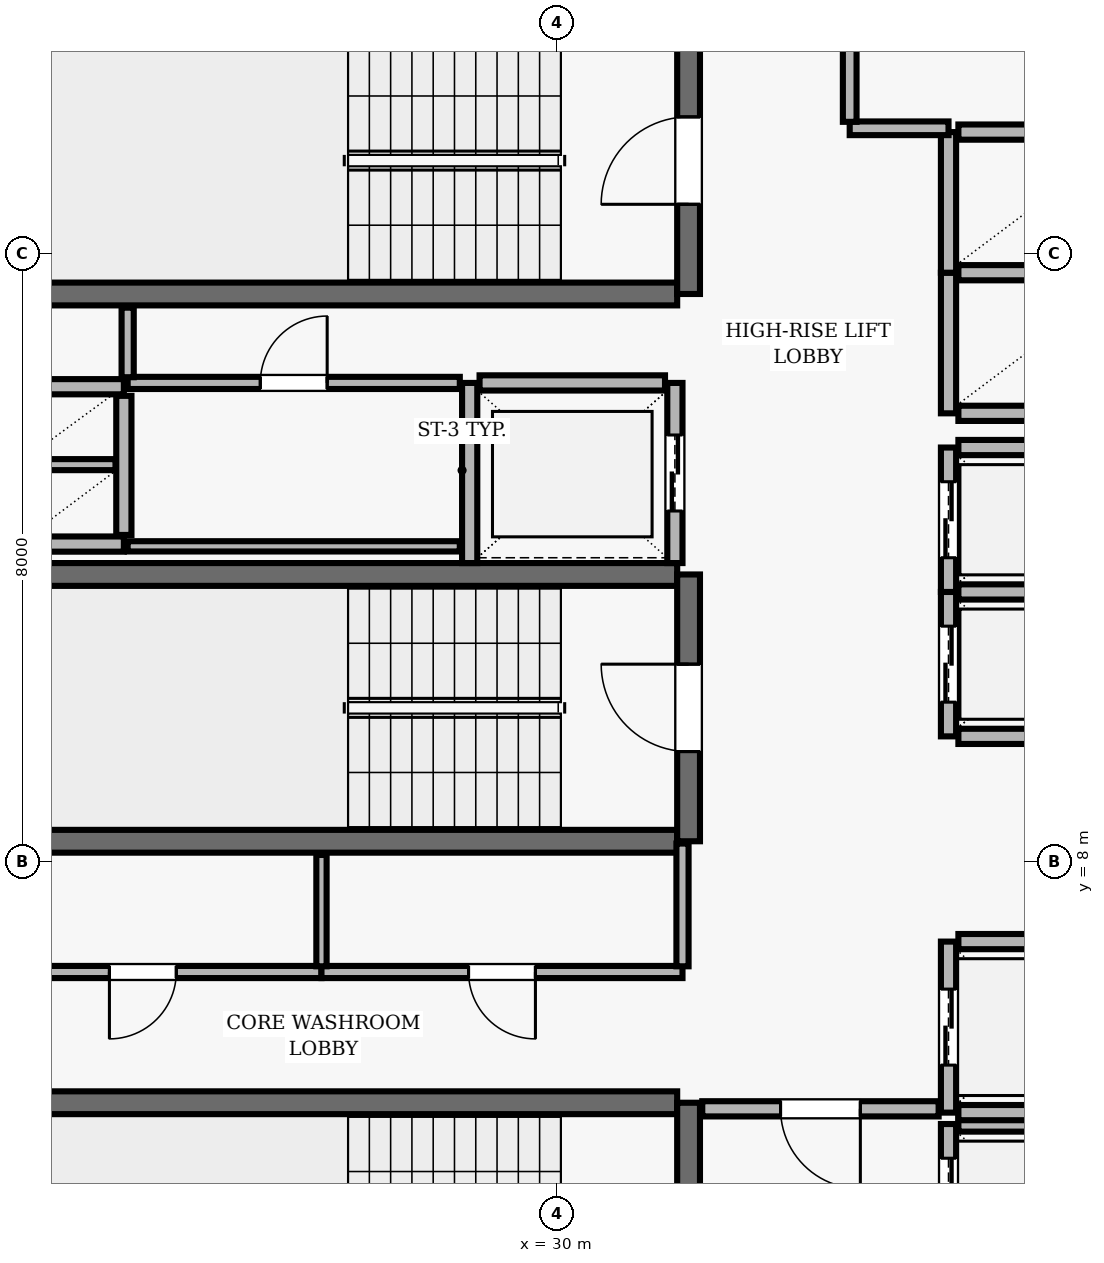
"""IFC4 building model, lengths in metres.
Left out: names, types, materials, properties, quantities, classifications, styles, units other than length and angle.
Written with IfcOpenShell. Run it as: python <this file> out.ifc"""

import sys

from ifc_helpers import new_model, si_unit, direction, frame, frame_2d, origin, place, context, subcontext, project, spatial, rectangle, extrude, element, fill, save


model = new_model("IFC4")
c1 = context("Model", 3, precision=1e-05, world=origin(), true_north=direction((0.0, 1.0)))
c2 = subcontext(c1, "Body", "Model", "MODEL_VIEW")
j1 = project(units=[si_unit("LENGTHUNIT", "METRE"), si_unit("PLANEANGLEUNIT", "RADIAN")], contexts=[c1])
p1 = place(None, origin())
s1 = spatial("IfcSite", under=j1, at=p1, CompositionType="ELEMENT")
p2 = place(p1, origin())
s2 = spatial("IfcBuilding", under=s1, at=p2, CompositionType="ELEMENT")
p3 = place(p2, frame((0.0, 0.0, 291.1)))
s3 = spatial("IfcBuildingStorey", under=s2, at=p3, CompositionType="ELEMENT", Elevation=291.1)
p4 = place(p3, frame((31.58, 4.83, 0.0), z_axis=(0.0, 0.0, 1.0), x_axis=(-1.0, 0.0, 0.0)))
e1 = element("IfcWall", 1, at=p4, inside=s3, PredefinedType="SHEAR", context=c2, shape_type="SweptSolid", body=[
    extrude(rectangle(XDim=8.36, YDim=0.3, at=frame_2d((4.18, 0.0))), origin(), (0.0, 0.0, 1.0), 3.69),
])
p5 = place(p3, frame((31.73, 0.96, 0.0), z_axis=(0.0, 0.0, 1.0), x_axis=(0.0, 1.0, 0.0)))
e2 = element("IfcWall", 2, at=p5, inside=s3, PredefinedType="SHEAR", context=c2, shape_type="SweptSolid", body=[
    extrude(rectangle(XDim=3.87, YDim=0.3, at=frame_2d((1.935, 0.0))), origin(), (0.0, 0.0, 1.0), 3.69),
])
p6 = place(p5, frame((1.54, 0.0, 0.0)))
e3 = element("IfcOpeningElement", 3, at=p6, cuts=e2, PredefinedType="OPENING", context=c2, shape_type="SweptSolid", body=[
    extrude(rectangle(XDim=1.15, YDim=2.15, at=frame_2d((0.575, 1.075))), frame((0.0, 0.16, 0.0), z_axis=(0.0, -1.0, 0.0), x_axis=(1.0, 0.0, 0.0)), (0.0, 0.0, 1.0), 0.32),
])
p7 = place(p3, frame((23.22, 15.47, 0.0), z_axis=(0.0, 0.0, 1.0), x_axis=(1.0, 0.0, 0.0)))
e4 = element("IfcWall", 4, at=p7, inside=s3, PredefinedType="SHEAR", context=c2, shape_type="SweptSolid", body=[
    extrude(rectangle(XDim=8.36, YDim=0.3, at=frame_2d((4.18, 0.0))), origin(), (0.0, 0.0, 1.0), 3.69),
])
p8 = place(p3, frame((31.73, 15.47, 0.0), z_axis=(0.0, 0.0, 1.0), x_axis=(0.0, 1.0, 0.0)))
e5 = element("IfcWall", 5, at=p8, inside=s3, PredefinedType="SHEAR", context=c2, shape_type="SweptSolid", body=[
    extrude(rectangle(XDim=3.51, YDim=0.3, at=frame_2d((1.755, 0.0))), origin(), (0.0, 0.0, 1.0), 3.69),
])
p9 = place(p8, frame((1.18, 0.0, 0.0)))
e6 = element("IfcOpeningElement", 6, at=p9, cuts=e5, PredefinedType="OPENING", context=c2, shape_type="SweptSolid", body=[
    extrude(rectangle(XDim=1.15, YDim=2.15, at=frame_2d((0.575, 1.075))), frame((0.0, 0.16, 0.0), z_axis=(0.0, -1.0, 0.0), x_axis=(1.0, 0.0, 0.0)), (0.0, 0.0, 1.0), 0.32),
])
for number, where, z_axis, x_axis in (
    (7, (31.58, 11.78, 0.0), (0.0, 0.0, 1.0), (-1.0, 0.0, 0.0)),
    (8, (23.22, 8.27, 0.0), (0.0, 0.0, 1.0), (1.0, 0.0, 0.0)),
):
    element("IfcWall", number, at=place(p3, frame(where, z_axis=z_axis, x_axis=x_axis)), inside=s3, PredefinedType="SHEAR", context=c2, shape_type="SweptSolid", body=[
        extrude(rectangle(XDim=8.36, YDim=0.3, at=frame_2d((4.18, 0.0))), origin(), (0.0, 0.0, 1.0), 3.69),
    ])
p10 = place(p3, frame((31.73, 8.27, 0.0), z_axis=(0.0, 0.0, 1.0), x_axis=(0.0, 1.0, 0.0)))
e9 = element("IfcWall", 9, at=p10, inside=s3, PredefinedType="SHEAR", context=c2, shape_type="SweptSolid", body=[
    extrude(rectangle(XDim=3.51, YDim=0.3, at=frame_2d((1.755, 0.0))), origin(), (0.0, 0.0, 1.0), 3.69),
])
p11 = place(p10, frame((1.18, 0.0, 0.0)))
e10 = element("IfcOpeningElement", 10, at=p11, cuts=e9, PredefinedType="OPENING", context=c2, shape_type="SweptSolid", body=[
    extrude(rectangle(XDim=1.15, YDim=2.15, at=frame_2d((0.575, 1.075))), frame((0.0, 0.16, 0.0), z_axis=(0.0, -1.0, 0.0), x_axis=(1.0, 0.0, 0.0)), (0.0, 0.0, 1.0), 0.32),
])
p12 = place(p3, frame((35.15, 4.55, 0.0), z_axis=(0.0, 0.0, 1.0), x_axis=(0.0, -1.0, 0.0)))
e11 = element("IfcWall", 11, at=p12, inside=s3, PredefinedType="SOLIDWALL", context=c2, shape_type="SweptSolid", body=[
    extrude(rectangle(XDim=2.1, YDim=0.2, at=frame_2d((1.05, 0.0))), origin(), (0.0, 0.0, 1.0), 3.69),
])
p13 = place(p12, frame((0.45, 0.0, 0.0)))
e12 = element("IfcOpeningElement", 12, at=p13, cuts=e11, PredefinedType="OPENING", context=c2, shape_type="SweptSolid", body=[
    extrude(rectangle(XDim=1.2, YDim=2.15, at=frame_2d((0.6, 1.075))), frame((0.0, 0.11, 0.0), z_axis=(0.0, -1.0, 0.0), x_axis=(1.0, 0.0, 0.0)), (0.0, 0.0, 1.0), 0.22),
])
p14 = place(p3, frame((37.42, 4.55, 0.0), z_axis=(0.0, 0.0, 1.0), x_axis=(-1.0, 0.0, 0.0)))
e13 = element("IfcWall", 13, at=p14, inside=s3, PredefinedType="SOLIDWALL", context=c2, shape_type="SweptSolid", body=[
    extrude(rectangle(XDim=2.14, YDim=0.2, at=frame_2d((1.07, 0.0))), origin(), (0.0, 0.0, 1.0), 3.69),
])
p15 = place(p3, frame((35.15, 6.95, 0.0), z_axis=(0.0, 0.0, 1.0), x_axis=(0.0, -1.0, 0.0)))
e14 = element("IfcWall", 14, at=p15, inside=s3, PredefinedType="SOLIDWALL", context=c2, shape_type="SweptSolid", body=[
    extrude(rectangle(XDim=2.25, YDim=0.2, at=frame_2d((1.125, 0.0))), origin(), (0.0, 0.0, 1.0), 3.69),
])
p16 = place(p15, frame((0.625, 0.0, 0.0)))
e15 = element("IfcOpeningElement", 15, at=p16, cuts=e14, PredefinedType="OPENING", context=c2, shape_type="SweptSolid", body=[
    extrude(rectangle(XDim=1.0, YDim=2.1, at=frame_2d((0.5, 1.05))), frame((0.0, 0.11, 0.0), z_axis=(0.0, -1.0, 0.0), x_axis=(1.0, 0.0, 0.0)), (0.0, 0.0, 1.0), 0.22),
])
for number, where, z_axis, x_axis in (
    (16, (35.28, 4.7, 0.0), (0.0, 0.0, 1.0), (1.0, 0.0, 0.0)),
    (17, (37.42, 6.95, 0.0), (0.0, 0.0, 1.0), (-1.0, 0.0, 0.0)),
):
    element("IfcWall", number, at=place(p3, frame(where, z_axis=z_axis, x_axis=x_axis)), inside=s3, PredefinedType="SOLIDWALL", context=c2, shape_type="SweptSolid", body=[
        extrude(rectangle(XDim=2.14, YDim=0.2, at=frame_2d((1.07, 0.0))), origin(), (0.0, 0.0, 1.0), 3.69),
    ])
p17 = place(p3, frame((35.15, 11.55, 0.0), z_axis=(0.0, 0.0, 1.0), x_axis=(0.0, -1.0, 0.0)))
e18 = element("IfcWall", 18, at=p17, inside=s3, PredefinedType="SOLIDWALL", context=c2, shape_type="SweptSolid", body=[
    extrude(rectangle(XDim=1.9, YDim=0.2, at=frame_2d((0.95, 0.0))), origin(), (0.0, 0.0, 1.0), 3.69),
])
p18 = place(p17, frame((0.45, 0.0, 0.0)))
e19 = element("IfcOpeningElement", 19, at=p18, cuts=e18, PredefinedType="OPENING", context=c2, shape_type="SweptSolid", body=[
    extrude(rectangle(XDim=1.0, YDim=2.1, at=frame_2d((0.5, 1.05))), frame((0.0, 0.11, 0.0), z_axis=(0.0, -1.0, 0.0), x_axis=(1.0, 0.0, 0.0)), (0.0, 0.0, 1.0), 0.22),
])
for number, where, z_axis, x_axis in (
    (20, (35.28, 9.65, 0.0), (0.0, 0.0, 1.0), (1.0, 0.0, 0.0)),
    (21, (37.42, 11.55, 0.0), (0.0, 0.0, 1.0), (-1.0, 0.0, 0.0)),
):
    element("IfcWall", number, at=place(p3, frame(where, z_axis=z_axis, x_axis=x_axis)), inside=s3, PredefinedType="SOLIDWALL", context=c2, shape_type="SweptSolid", body=[
        extrude(rectangle(XDim=2.14, YDim=0.2, at=frame_2d((1.07, 0.0))), origin(), (0.0, 0.0, 1.0), 3.69),
    ])
p19 = place(p3, frame((35.15, 13.45, 0.0), z_axis=(0.0, 0.0, 1.0), x_axis=(0.0, -1.0, 0.0)))
e22 = element("IfcWall", 22, at=p19, inside=s3, PredefinedType="SOLIDWALL", context=c2, shape_type="SweptSolid", body=[
    extrude(rectangle(XDim=1.9, YDim=0.2, at=frame_2d((0.95, 0.0))), origin(), (0.0, 0.0, 1.0), 3.69),
])
p20 = place(p19, frame((0.45, 0.0, 0.0)))
e23 = element("IfcOpeningElement", 23, at=p20, cuts=e22, PredefinedType="OPENING", context=c2, shape_type="SweptSolid", body=[
    extrude(rectangle(XDim=1.0, YDim=2.1, at=frame_2d((0.5, 1.05))), frame((0.0, 0.11, 0.0), z_axis=(0.0, -1.0, 0.0), x_axis=(1.0, 0.0, 0.0)), (0.0, 0.0, 1.0), 0.22),
])
p21 = place(p3, frame((37.42, 13.45, 0.0), z_axis=(0.0, 0.0, 1.0), x_axis=(-1.0, 0.0, 0.0)))
e24 = element("IfcWall", 24, at=p21, inside=s3, PredefinedType="SOLIDWALL", context=c2, shape_type="SweptSolid", body=[
    extrude(rectangle(XDim=2.14, YDim=0.2, at=frame_2d((1.07, 0.0))), origin(), (0.0, 0.0, 1.0), 3.69),
])
p22 = place(p3, frame((28.85, 14.3, 0.0), z_axis=(0.0, 0.0, 1.0), x_axis=(0.0, -1.0, 0.0)))
e25 = element("IfcWall", 25, at=p22, inside=s3, PredefinedType="SOLIDWALL", context=c2, shape_type="SweptSolid", body=[
    extrude(rectangle(XDim=2.37, YDim=0.2, at=frame_2d((1.185, 0.0))), origin(), (0.0, 0.0, 1.0), 3.69),
])
p23 = place(p3, frame((31.55, 11.93, 0.0), z_axis=(0.0, 0.0, 1.0), x_axis=(0.0, 1.0, 0.0)))
e26 = element("IfcWall", 26, at=p23, inside=s3, PredefinedType="SOLIDWALL", context=c2, shape_type="SweptSolid", body=[
    extrude(rectangle(XDim=2.37, YDim=0.2, at=frame_2d((1.185, 0.0))), origin(), (0.0, 0.0, 1.0), 3.69),
])
p24 = place(p23, frame((0.685, 0.0, 0.0)))
e27 = element("IfcOpeningElement", 27, at=p24, cuts=e26, PredefinedType="OPENING", context=c2, shape_type="SweptSolid", body=[
    extrude(rectangle(XDim=1.0, YDim=2.1, at=frame_2d((0.5, 1.05))), frame((0.0, 0.11, 0.0), z_axis=(0.0, -1.0, 0.0), x_axis=(1.0, 0.0, 0.0)), (0.0, 0.0, 1.0), 0.22),
])
p25 = place(p3, frame((31.42, 14.3, 0.0), z_axis=(0.0, 0.0, 1.0), x_axis=(-1.0, 0.0, 0.0)))
e28 = element("IfcWall", 28, at=p25, inside=s3, PredefinedType="SOLIDWALL", context=c2, shape_type="SweptSolid", body=[
    extrude(rectangle(XDim=2.44, YDim=0.2, at=frame_2d((1.22, 0.0))), origin(), (0.0, 0.0, 1.0), 3.69),
])
p26 = place(p3, frame((35.15, 15.75, 0.0), z_axis=(0.0, 0.0, 1.0), x_axis=(0.0, -1.0, 0.0)))
e29 = element("IfcWall", 29, at=p26, inside=s3, PredefinedType="SOLIDWALL", context=c2, shape_type="SweptSolid", body=[
    extrude(rectangle(XDim=1.85, YDim=0.2, at=frame_2d((0.925, 0.0))), origin(), (0.0, 0.0, 1.0), 3.69),
])
for number, where, z_axis, x_axis in (
    (30, (35.28, 13.9, 0.0), (0.0, 0.0, 1.0), (1.0, 0.0, 0.0)),
    (31, (37.42, 15.75, 0.0), (0.0, 0.0, 1.0), (-1.0, 0.0, 0.0)),
):
    element("IfcWall", number, at=place(p3, frame(where, z_axis=z_axis, x_axis=x_axis)), inside=s3, PredefinedType="SOLIDWALL", context=c2, shape_type="SweptSolid", body=[
        extrude(rectangle(XDim=2.14, YDim=0.2, at=frame_2d((1.07, 0.0))), origin(), (0.0, 0.0, 1.0), 3.69),
    ])
p27 = place(p3, frame((35.15, 17.6, 0.0), z_axis=(0.0, 0.0, 1.0), x_axis=(0.0, -1.0, 0.0)))
e32 = element("IfcWall", 32, at=p27, inside=s3, PredefinedType="SOLIDWALL", context=c2, shape_type="SweptSolid", body=[
    extrude(rectangle(XDim=1.85, YDim=0.2, at=frame_2d((0.925, 0.0))), origin(), (0.0, 0.0, 1.0), 3.69),
])
p28 = place(p3, frame((37.42, 17.6, 0.0), z_axis=(0.0, 0.0, 1.0), x_axis=(-1.0, 0.0, 0.0)))
e33 = element("IfcWall", 33, at=p28, inside=s3, PredefinedType="SOLIDWALL", context=c2, shape_type="SweptSolid", body=[
    extrude(rectangle(XDim=2.14, YDim=0.2, at=frame_2d((1.07, 0.0))), origin(), (0.0, 0.0, 1.0), 3.69),
])
for number, where, z_axis, x_axis in (
    (34, (22.9, 14.25, 0.0), (0.0, 0.0, 1.0), (1.0, 0.0, 0.0)),
    (35, (22.9, 12.18, 0.0), (0.0, 0.0, 1.0), (1.0, 0.0, 0.0)),
):
    element("IfcWall", number, at=place(p3, frame(where, z_axis=z_axis, x_axis=x_axis)), inside=s3, PredefinedType="SOLIDWALL", context=c2, shape_type="SweptSolid", body=[
        extrude(rectangle(XDim=1.4, YDim=0.2, at=frame_2d((0.7, 0.0))), origin(), (0.0, 0.0, 1.0), 3.69),
    ])
p29 = place(p3, frame((24.3, 12.3, 0.0), z_axis=(0.0, 0.0, 1.0), x_axis=(0.0, 1.0, 0.0)))
e36 = element("IfcWall", 36, at=p29, inside=s3, PredefinedType="SOLIDWALL", context=c2, shape_type="SweptSolid", body=[
    extrude(rectangle(XDim=1.83, YDim=0.2, at=frame_2d((0.915, 0.0))), origin(), (0.0, 0.0, 1.0), 3.69),
])
p30 = place(p3, frame((23.01, 13.225, 0.0), z_axis=(0.0, 0.0, 1.0), x_axis=(1.0, 0.0, 0.0)))
e37 = element("IfcWall", 37, at=p30, inside=s3, PredefinedType="PARTITIONING", context=c2, shape_type="SweptSolid", body=[
    extrude(rectangle(XDim=1.18, YDim=0.145, at=frame_2d((0.59, 0.0))), origin(), (0.0, 0.0, 1.0), 3.69),
])
p31 = place(p3, frame((24.35, 12.15, 0.0), z_axis=(0.0, 0.0, 1.0), x_axis=(1.0, 0.0, 0.0)))
e38 = element("IfcWall", 38, at=p31, inside=s3, PredefinedType="PARTITIONING", context=c2, shape_type="SweptSolid", body=[
    extrude(rectangle(XDim=4.37, YDim=0.135, at=frame_2d((2.185, 0.0))), origin(), (0.0, 0.0, 1.0), 3.69),
])
p32 = place(p3, frame((24.35, 14.3, 0.0), z_axis=(0.0, 0.0, 1.0), x_axis=(1.0, 0.0, 0.0)))
e39 = element("IfcWall", 39, at=p32, inside=s3, PredefinedType="PARTITIONING", context=c2, shape_type="SweptSolid", body=[
    extrude(rectangle(XDim=4.37, YDim=0.16, at=frame_2d((2.185, 0.0))), origin(), (0.0, 0.0, 1.0), 3.69),
])
p33 = place(p32, frame((1.745, 0.0, 0.0)))
e40 = element("IfcOpeningElement", 40, at=p33, cuts=e39, PredefinedType="OPENING", context=c2, shape_type="SweptSolid", body=[
    extrude(rectangle(XDim=0.88, YDim=2.1, at=frame_2d((0.44, 1.05))), frame((0.0, 0.09, 0.0), z_axis=(0.0, -1.0, 0.0), x_axis=(1.0, 0.0, 0.0)), (0.0, 0.0, 1.0), 0.18),
])
p34 = place(p3, frame((26.9, 6.55, 0.0), z_axis=(0.0, 0.0, 1.0), x_axis=(-1.0, 0.0, 0.0)))
e41 = element("IfcWall", 41, at=p34, inside=s3, PredefinedType="PARTITIONING", context=c2, shape_type="SweptSolid", body=[
    extrude(rectangle(XDim=4.7, YDim=0.16, at=frame_2d((2.35, 0.0))), origin(), (0.0, 0.0, 1.0), 3.69),
])
p35 = place(p34, frame((1.91, 0.0, 0.0)))
e42 = element("IfcOpeningElement", 42, at=p35, cuts=e41, PredefinedType="OPENING", context=c2, shape_type="SweptSolid", body=[
    extrude(rectangle(XDim=0.88, YDim=2.1, at=frame_2d((0.44, 1.05))), frame((0.0, 0.09, 0.0), z_axis=(0.0, -1.0, 0.0), x_axis=(1.0, 0.0, 0.0)), (0.0, 0.0, 1.0), 0.18),
])
p36 = place(p3, frame((31.65, 6.55, 0.0), z_axis=(0.0, 0.0, 1.0), x_axis=(-1.0, 0.0, 0.0)))
e43 = element("IfcWall", 43, at=p36, inside=s3, PredefinedType="PARTITIONING", context=c2, shape_type="SweptSolid", body=[
    extrude(rectangle(XDim=4.75, YDim=0.16, at=frame_2d((2.375, 0.0))), origin(), (0.0, 0.0, 1.0), 3.69),
])
p37 = place(p36, frame((1.935, 0.0, 0.0)))
e44 = element("IfcOpeningElement", 44, at=p37, cuts=e43, PredefinedType="OPENING", context=c2, shape_type="SweptSolid", body=[
    extrude(rectangle(XDim=0.88, YDim=2.1, at=frame_2d((0.44, 1.05))), frame((0.0, 0.09, 0.0), z_axis=(0.0, -1.0, 0.0), x_axis=(1.0, 0.0, 0.0)), (0.0, 0.0, 1.0), 0.18),
])
p38 = place(p3, frame((33.85, 17.65, 0.0), z_axis=(0.0, 0.0, 1.0), x_axis=(1.0, 0.0, 0.0)))
e45 = element("IfcWall", 45, at=p38, inside=s3, PredefinedType="PARTITIONING", context=c2, shape_type="SweptSolid", body=[
    extrude(rectangle(XDim=1.3, YDim=0.18, at=frame_2d((0.65, 0.0))), origin(), (0.0, 0.0, 1.0), 3.69),
])
p39 = place(p3, frame((35.02, 4.75, 0.0), z_axis=(0.0, 0.0, 1.0), x_axis=(-1.0, 0.0, 0.0)))
e46 = element("IfcWall", 46, at=p39, inside=s3, PredefinedType="SOLIDWALL", context=c2, shape_type="SweptSolid", body=[
    extrude(rectangle(XDim=3.11, YDim=0.2, at=frame_2d((1.555, 0.0))), origin(), (0.0, 0.0, 1.0), 3.69),
])
p40 = place(p39, frame((1.03, 0.0, 0.0)))
e47 = element("IfcOpeningElement", 47, at=p40, cuts=e46, PredefinedType="OPENING", context=c2, shape_type="SweptSolid", body=[
    extrude(rectangle(XDim=1.05, YDim=2.15, at=frame_2d((0.525, 1.075))), frame((0.0, 0.11, 0.0), z_axis=(0.0, -1.0, 0.0), x_axis=(1.0, 0.0, 0.0)), (0.0, 0.0, 1.0), 0.22),
])
p41 = place(p3, frame((24.35, 15.29, 0.0), z_axis=(0.0, 0.0, 1.0), x_axis=(0.0, -1.0, 0.0)))
e48 = element("IfcWall", 48, at=p41, inside=s3, PredefinedType="PARTITIONING", context=c2, shape_type="SweptSolid", body=[
    extrude(rectangle(XDim=0.915, YDim=0.16, at=frame_2d((0.458, 0.0))), origin(), (0.0, 0.0, 1.0), 3.69),
])
p42 = place(p3, frame((26.9, 6.625, 0.0), z_axis=(0.0, 0.0, 1.0), x_axis=(0.0, 1.0, 0.0)))
e49 = element("IfcWall", 49, at=p42, inside=s3, PredefinedType="PARTITIONING", context=c2, shape_type="SweptSolid", body=[
    extrude(rectangle(XDim=1.465, YDim=0.135, at=frame_2d((0.732, 0.0))), origin(), (0.0, 0.0, 1.0), 3.69),
])
p43 = place(p3, frame((31.65, 8.24, 0.0), z_axis=(0.0, 0.0, 1.0), x_axis=(0.0, -1.0, 0.0)))
e50 = element("IfcWall", 50, at=p43, inside=s3, PredefinedType="PARTITIONING", context=c2, shape_type="SweptSolid", body=[
    extrude(rectangle(XDim=1.615, YDim=0.16, at=frame_2d((0.808, 0.0))), origin(), (0.0, 0.0, 1.0), 3.69),
])
p44 = place(p3, frame((33.85, 17.735, 0.0), z_axis=(0.0, 0.0, 1.0), x_axis=(0.0, 1.0, 0.0)))
e51 = element("IfcWall", 51, at=p44, inside=s3, PredefinedType="PARTITIONING", context=c2, shape_type="SweptSolid", body=[
    extrude(rectangle(XDim=2.93, YDim=0.18, at=frame_2d((1.465, 0.0))), origin(), (0.0, 0.0, 1.0), 3.69),
])
p45 = place(p44, frame((0.99, 0.0, 0.0)))
e52 = element("IfcOpeningElement", 52, at=p45, cuts=e51, PredefinedType="OPENING", context=c2, shape_type="SweptSolid", body=[
    extrude(rectangle(XDim=0.95, YDim=2.1, at=frame_2d((0.475, 1.05))), frame((0.0, 0.1, 0.0), z_axis=(0.0, -1.0, 0.0), x_axis=(1.0, 0.0, 0.0)), (0.0, 0.0, 1.0), 0.2),
])
p46 = place(p9, origin())
e53 = element("IfcDoor", 53, at=p46, inside=s3, OperationType="SINGLE_SWING_LEFT", PredefinedType="DOOR", context=c2, shape_type="SweptSolid", body=[
    extrude(rectangle(XDim=1.15, YDim=2.15, at=frame_2d((0.575, 1.075))), frame((0.0, 0.025, 0.0), z_axis=(0.0, -1.0, 0.0), x_axis=(1.0, 0.0, 0.0)), (0.0, 0.0, 1.0), 0.05),
])
fill(e6, e53)
p47 = place(p11, origin())
e54 = element("IfcDoor", 54, at=p47, inside=s3, OperationType="SINGLE_SWING_RIGHT", PredefinedType="DOOR", context=c2, shape_type="SweptSolid", body=[
    extrude(rectangle(XDim=1.15, YDim=2.15, at=frame_2d((0.575, 1.075))), frame((0.0, 0.025, 0.0), z_axis=(0.0, -1.0, 0.0), x_axis=(1.0, 0.0, 0.0)), (0.0, 0.0, 1.0), 0.05),
])
fill(e10, e54)
p48 = place(p13, origin())
e55 = element("IfcDoor", 55, at=p48, inside=s3, OperationType="DOUBLE_DOOR_SLIDING", PredefinedType="DOOR", context=c2, shape_type="SweptSolid", body=[
    extrude(rectangle(XDim=1.2, YDim=2.15, at=frame_2d((0.6, 1.075))), frame((0.0, 0.025, 0.0), z_axis=(0.0, -1.0, 0.0), x_axis=(1.0, 0.0, 0.0)), (0.0, 0.0, 1.0), 0.05),
])
fill(e12, e55)
p49 = place(p16, origin())
e56 = element("IfcDoor", 56, at=p49, inside=s3, OperationType="DOUBLE_DOOR_SLIDING", PredefinedType="DOOR", context=c2, shape_type="SweptSolid", body=[
    extrude(rectangle(XDim=1.0, YDim=2.1, at=frame_2d((0.5, 1.05))), frame((0.0, 0.025, 0.0), z_axis=(0.0, -1.0, 0.0), x_axis=(1.0, 0.0, 0.0)), (0.0, 0.0, 1.0), 0.05),
])
fill(e15, e56)
p50 = place(p18, origin())
e57 = element("IfcDoor", 57, at=p50, inside=s3, OperationType="DOUBLE_DOOR_SLIDING", PredefinedType="DOOR", context=c2, shape_type="SweptSolid", body=[
    extrude(rectangle(XDim=1.0, YDim=2.1, at=frame_2d((0.5, 1.05))), frame((0.0, 0.025, 0.0), z_axis=(0.0, -1.0, 0.0), x_axis=(1.0, 0.0, 0.0)), (0.0, 0.0, 1.0), 0.05),
])
fill(e19, e57)
p51 = place(p20, origin())
e58 = element("IfcDoor", 58, at=p51, inside=s3, OperationType="DOUBLE_DOOR_SLIDING", PredefinedType="DOOR", context=c2, shape_type="SweptSolid", body=[
    extrude(rectangle(XDim=1.0, YDim=2.1, at=frame_2d((0.5, 1.05))), frame((0.0, 0.025, 0.0), z_axis=(0.0, -1.0, 0.0), x_axis=(1.0, 0.0, 0.0)), (0.0, 0.0, 1.0), 0.05),
])
fill(e23, e58)
p52 = place(p24, origin())
e59 = element("IfcDoor", 59, at=p52, inside=s3, OperationType="DOUBLE_DOOR_SLIDING", PredefinedType="DOOR", context=c2, shape_type="SweptSolid", body=[
    extrude(rectangle(XDim=1.0, YDim=2.1, at=frame_2d((0.5, 1.05))), frame((0.0, 0.025, 0.0), z_axis=(0.0, -1.0, 0.0), x_axis=(1.0, 0.0, 0.0)), (0.0, 0.0, 1.0), 0.05),
])
fill(e27, e59)
p53 = place(p40, origin())
e60 = element("IfcDoor", 60, at=p53, inside=s3, OperationType="SINGLE_SWING_LEFT", PredefinedType="DOOR", context=c2, shape_type="SweptSolid", body=[
    extrude(rectangle(XDim=1.05, YDim=2.15, at=frame_2d((0.525, 1.075))), frame((0.0, 0.025, 0.0), z_axis=(0.0, -1.0, 0.0), x_axis=(1.0, 0.0, 0.0)), (0.0, 0.0, 1.0), 0.05),
])
fill(e47, e60)
p54 = place(p35, origin())
e61 = element("IfcDoor", 61, at=p54, inside=s3, OperationType="SINGLE_SWING_RIGHT", PredefinedType="DOOR", context=c2, shape_type="SweptSolid", body=[
    extrude(rectangle(XDim=0.88, YDim=2.1, at=frame_2d((0.44, 1.05))), frame((0.0, 0.025, 0.0), z_axis=(0.0, -1.0, 0.0), x_axis=(1.0, 0.0, 0.0)), (0.0, 0.0, 1.0), 0.05),
])
fill(e42, e61)
p55 = place(p37, origin())
e62 = element("IfcDoor", 62, at=p55, inside=s3, OperationType="SINGLE_SWING_LEFT", PredefinedType="DOOR", context=c2, shape_type="SweptSolid", body=[
    extrude(rectangle(XDim=0.88, YDim=2.1, at=frame_2d((0.44, 1.05))), frame((0.0, 0.025, 0.0), z_axis=(0.0, -1.0, 0.0), x_axis=(1.0, 0.0, 0.0)), (0.0, 0.0, 1.0), 0.05),
])
fill(e44, e62)
p56 = place(p33, origin())
e63 = element("IfcDoor", 63, at=p56, inside=s3, OperationType="SINGLE_SWING_RIGHT", PredefinedType="DOOR", context=c2, shape_type="SweptSolid", body=[
    extrude(rectangle(XDim=0.88, YDim=2.1, at=frame_2d((0.44, 1.05))), frame((0.0, 0.025, 0.0), z_axis=(0.0, -1.0, 0.0), x_axis=(1.0, 0.0, 0.0)), (0.0, 0.0, 1.0), 0.05),
])
fill(e40, e63)
save(model, sys.argv[1])
